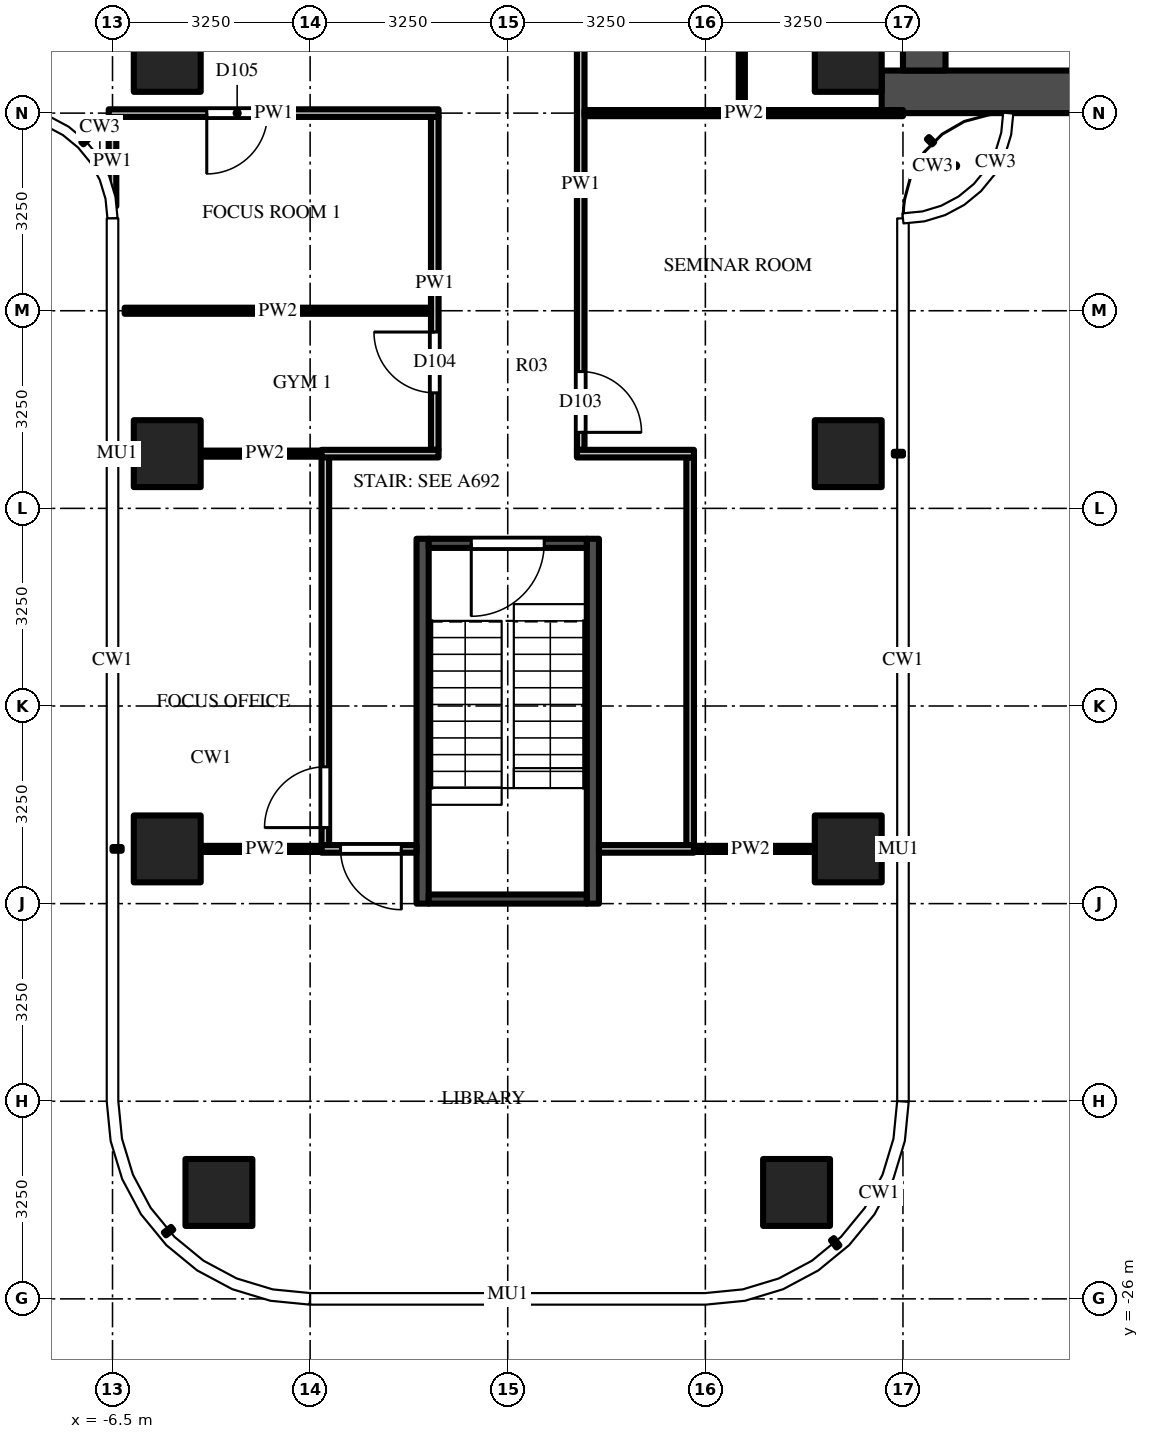
"""IFC4 building model, lengths in metres.
Left out: names, types, materials, properties, quantities, classifications, styles, units other than length and angle.
Written with IfcOpenShell. Run it as: python <this file> out.ifc"""

import sys

from ifc_helpers import new_model, si_unit, direction, frame, frame_2d, origin, origin_2d, place, context, subcontext, project, spatial, rectangle, extrude, source, transform, mapped, element, fill, save


model = new_model("IFC4")
c1 = context("Model", 3, precision=1e-05, world=origin(), true_north=direction((0.0, 1.0)))
c2 = subcontext(c1, "Body", "Model", "MODEL_VIEW")
j1 = project(units=[si_unit("LENGTHUNIT", "METRE"), si_unit("PLANEANGLEUNIT", "RADIAN")], contexts=[c1])
p1 = place(None, origin())
s1 = spatial("IfcSite", under=j1, at=p1, CompositionType="ELEMENT")
p2 = place(p1, origin())
s2 = spatial("IfcBuilding", under=s1, at=p2, CompositionType="ELEMENT")
p3 = place(p2, frame((0.0, 0.0, 220.7)))
s3 = spatial("IfcBuildingStorey", under=s2, at=p3, CompositionType="ELEMENT", Elevation=220.7)
m1 = source(origin(), c2, "Body", "SweptSolid", [
    extrude(rectangle(XDim=1.1, YDim=1.1, at=origin_2d()), origin(), (0.0, 0.0, 1.0), 3.9),
])
for number, where, z_axis, x_axis in (
    (1, (5.6, -5.6, 0.0), (0.0, 0.0, 1.0), (1.0, 0.0, 0.0)),
    (2, (-5.6, -5.6, 0.0), (0.0, 0.0, 1.0), (1.0, 0.0, 0.0)),
    (3, (5.6, -12.1, 0.0), (0.0, 0.0, 1.0), (1.0, 0.0, 0.0)),
    (4, (5.6, -18.6, 0.0), (0.0, 0.0, 1.0), (1.0, 0.0, 0.0)),
    (5, (4.75, -24.25, 0.0), (0.0, 0.0, 1.0), (1.0, 0.0, 0.0)),
    (6, (-5.6, -12.1, 0.0), (0.0, 0.0, 1.0), (1.0, 0.0, 0.0)),
    (7, (-5.6, -18.6, 0.0), (0.0, 0.0, 1.0), (1.0, 0.0, 0.0)),
    (8, (-4.75, -24.25, 0.0), (0.0, 0.0, 1.0), (1.0, 0.0, 0.0)),
):
    element("IfcColumn", number, at=place(p3, frame(where, z_axis=z_axis, x_axis=x_axis)), inside=s3, PredefinedType="COLUMN", context=c2, shape_type="MappedRepresentation", body=[
        mapped(m1, transform((0.0, 0.0, 0.0))),
    ])
m2 = source(origin(), c2, "Body", "SweptSolid", [
    extrude(rectangle(XDim=16.6, YDim=0.7, at=frame_2d((8.3, 0.0))), origin(), (0.0, 0.0, 1.0), 3.7),
])
p4 = place(p3, frame((6.15, -6.15, 0.0), z_axis=(0.0, 0.0, 1.0), x_axis=(1.0, 0.0, 0.0)))
e9 = element("IfcWall", 9, at=p4, inside=s3, PredefinedType="SHEAR", context=c2, shape_type="MappedRepresentation", body=[
    mapped(m2, transform((0.0, 0.0, 0.0))),
])
m3 = source(origin(), c2, "Body", "SweptSolid", [
    extrude(rectangle(XDim=9.05, YDim=0.7, at=frame_2d((4.525, 0.0))), origin(), (0.0, 0.0, 1.0), 3.7),
])
p5 = place(p3, frame((6.85, -5.8, 0.0), z_axis=(0.0, 0.0, 1.0), x_axis=(0.0, 1.0, 0.0)))
e10 = element("IfcWall", 10, at=p5, inside=s3, PredefinedType="SHEAR", context=c2, shape_type="MappedRepresentation", body=[
    mapped(m3, transform((0.0, 0.0, 0.0))),
])
m4 = source(origin(), c2, "Body", "SweptSolid", [
    extrude(rectangle(XDim=1.8, YDim=2.1, at=frame_2d((0.9, 1.05))), frame((0.0, 0.36, 0.0), z_axis=(0.0, -1.0, 0.0), x_axis=(1.0, 0.0, 0.0)), (0.0, 0.0, 1.0), 0.72),
])
p6 = place(p5, frame((3.15, 0.0, 0.0)))
e11 = element("IfcOpeningElement", 11, at=p6, cuts=e10, PredefinedType="OPENING", context=c2, shape_type="MappedRepresentation", body=[
    mapped(m4, transform((0.0, 0.0, 0.0))),
])
m5 = source(origin(), c2, "Body", "SweptSolid", [
    extrude(rectangle(XDim=6.0, YDim=0.2, at=frame_2d((3.0, 0.0))), origin(), (0.0, 0.0, 1.0), 3.7),
])
for number, where, z_axis, x_axis in (
    (12, (1.4, -13.5, 0.0), (0.0, 0.0, 1.0), (0.0, -1.0, 0.0)),
    (13, (-1.4, -13.5, 0.0), (0.0, 0.0, 1.0), (0.0, -1.0, 0.0)),
):
    element("IfcWall", number, at=place(p3, frame(where, z_axis=z_axis, x_axis=x_axis)), inside=s3, PredefinedType="SHEAR", context=c2, shape_type="MappedRepresentation", body=[
        mapped(m5, transform((0.0, 0.0, 0.0))),
    ])
m6 = source(origin(), c2, "Body", "SweptSolid", [
    extrude(rectangle(XDim=2.6, YDim=0.15, at=frame_2d((1.3, 0.0))), origin(), (0.0, 0.0, 1.0), 3.7),
])
p7 = place(p3, frame((1.3, -13.575, 0.0), z_axis=(0.0, 0.0, 1.0), x_axis=(-1.0, 0.0, 0.0)))
e14 = element("IfcWall", 14, at=p7, inside=s3, PredefinedType="SHEAR", context=c2, shape_type="MappedRepresentation", body=[
    mapped(m6, transform((0.0, 0.0, 0.0))),
])
m7 = source(origin(), c2, "Body", "SweptSolid", [
    extrude(rectangle(XDim=1.2, YDim=2.1, at=frame_2d((0.6, 1.05))), frame((0.0, 0.085, 0.0), z_axis=(0.0, -1.0, 0.0), x_axis=(1.0, 0.0, 0.0)), (0.0, 0.0, 1.0), 0.17),
])
p8 = place(p7, frame((0.7, 0.0, 0.0)))
e15 = element("IfcOpeningElement", 15, at=p8, cuts=e14, PredefinedType="OPENING", context=c2, shape_type="MappedRepresentation", body=[
    mapped(m7, transform((0.0, 0.0, 0.0))),
])
p9 = place(p3, frame((1.3, -19.425, 0.0), z_axis=(0.0, 0.0, 1.0), x_axis=(-1.0, 0.0, 0.0)))
e16 = element("IfcWall", 16, at=p9, inside=s3, PredefinedType="SHEAR", context=c2, shape_type="MappedRepresentation", body=[
    mapped(m6, transform((0.0, 0.0, 0.0))),
])
m8 = source(origin(), c2, "Body", "SweptSolid", [
    extrude(rectangle(XDim=1.469, YDim=0.125, at=frame_2d((0.734, 0.0))), origin(), (0.0, 0.0, 1.0), 3.7),
])
p10 = place(p3, frame((-6.5, -6.562, 0.0), z_axis=(0.0, 0.0, 1.0), x_axis=(0.0, -1.0, 0.0)))
e17 = element("IfcWall", 17, at=p10, inside=s3, PredefinedType="PARTITIONING", context=c2, shape_type="MappedRepresentation", body=[
    mapped(m8, transform((0.0, 0.0, 0.0))),
])
m9 = source(origin(), c2, "Body", "SweptSolid", [
    extrude(rectangle(XDim=6.4, YDim=0.125, at=frame_2d((3.2, 0.0))), origin(), (0.0, 0.0, 1.0), 2.997),
])
p11 = place(p3, frame((-3.0, -18.55, 0.0), z_axis=(0.0, 0.0, 1.0), x_axis=(0.0, 1.0, 0.0)))
e18 = element("IfcWall", 18, at=p11, inside=s3, PredefinedType="PARTITIONING", context=c2, shape_type="MappedRepresentation", body=[
    mapped(m9, transform((0.0, 0.0, 0.0))),
])
m10 = source(origin(), c2, "Body", "SweptSolid", [
    extrude(rectangle(XDim=1.0, YDim=2.1, at=frame_2d((0.5, 1.05))), frame((0.0, 0.073, 0.0), z_axis=(0.0, -1.0, 0.0), x_axis=(1.0, 0.0, 0.0)), (0.0, 0.0, 1.0), 0.145),
])
p12 = place(p11, frame((0.3, 0.0, 0.0)))
e19 = element("IfcOpeningElement", 19, at=p12, cuts=e18, PredefinedType="OPENING", context=c2, shape_type="MappedRepresentation", body=[
    mapped(m10, transform((0.0, 0.0, 0.0))),
])
m11 = source(origin(), c2, "Body", "SweptSolid", [
    extrude(rectangle(XDim=5.475, YDim=0.125, at=frame_2d((2.738, 0.0))), origin(), (0.0, 0.0, 1.0), 2.997),
])
p13 = place(p3, frame((-1.2, -12.038, 0.0), z_axis=(0.0, 0.0, 1.0), x_axis=(0.0, 1.0, 0.0)))
e20 = element("IfcWall", 20, at=p13, inside=s3, PredefinedType="PARTITIONING", context=c2, shape_type="MappedRepresentation", body=[
    mapped(m11, transform((0.0, 0.0, 0.0))),
])
p14 = place(p13, frame((0.938, 0.0, 0.0)))
e21 = element("IfcOpeningElement", 21, at=p14, cuts=e20, PredefinedType="OPENING", context=c2, shape_type="MappedRepresentation", body=[
    mapped(m10, transform((0.0, 0.0, 0.0))),
])
m12 = source(origin(), c2, "Body", "SweptSolid", [
    extrude(rectangle(XDim=8.725, YDim=0.125, at=frame_2d((4.363, 0.0))), origin(), (0.0, 0.0, 1.0), 2.997),
])
p15 = place(p3, frame((1.2, -3.312, 0.0), z_axis=(0.0, 0.0, 1.0), x_axis=(0.0, -1.0, 0.0)))
e22 = element("IfcWall", 22, at=p15, inside=s3, PredefinedType="PARTITIONING", context=c2, shape_type="MappedRepresentation", body=[
    mapped(m12, transform((0.0, 0.0, 0.0))),
])
p16 = place(p15, frame((7.438, 0.0, 0.0)))
e23 = element("IfcOpeningElement", 23, at=p16, cuts=e22, PredefinedType="OPENING", context=c2, shape_type="MappedRepresentation", body=[
    mapped(m10, transform((0.0, 0.0, 0.0))),
])
m13 = source(origin(), c2, "Body", "SweptSolid", [
    extrude(rectangle(XDim=1.1, YDim=2.1, at=frame_2d((0.55, 1.05))), frame((0.0, 0.073, 0.0), z_axis=(0.0, -1.0, 0.0), x_axis=(1.0, 0.0, 0.0)), (0.0, 0.0, 1.0), 0.145),
])
p17 = place(p15, frame((0.288, 0.0, 0.0)))
e24 = element("IfcOpeningElement", 24, at=p17, cuts=e22, PredefinedType="OPENING", context=c2, shape_type="MappedRepresentation", body=[
    mapped(m13, transform((0.0, 0.0, 0.0))),
])
m14 = source(origin(), c2, "Body", "SweptSolid", [
    extrude(rectangle(XDim=6.387, YDim=0.125, at=frame_2d((3.194, 0.0))), origin(), (0.0, 0.0, 1.0), 2.997),
])
p18 = place(p3, frame((3.0, -12.163, 0.0), z_axis=(0.0, 0.0, 1.0), x_axis=(0.0, -1.0, 0.0)))
e25 = element("IfcWall", 25, at=p18, inside=s3, PredefinedType="PARTITIONING", context=c2, shape_type="MappedRepresentation", body=[
    mapped(m14, transform((0.0, 0.0, 0.0))),
])
m15 = source(origin(), c2, "Body", "SweptSolid", [
    extrude(rectangle(XDim=3.137, YDim=0.1, at=frame_2d((1.569, 0.0))), origin(), (0.0, 0.0, 1.0), 2.997),
])
p19 = place(p3, frame((3.85, -6.45, 0.0), z_axis=(0.0, 0.0, 1.0), x_axis=(0.0, 1.0, 0.0)))
e26 = element("IfcWall", 26, at=p19, inside=s3, PredefinedType="PARTITIONING", context=c2, shape_type="MappedRepresentation", body=[
    mapped(m15, transform((0.0, 0.0, 0.0))),
])
m16 = source(origin(), c2, "Body", "SweptSolid", [
    extrude(rectangle(XDim=2.113, YDim=0.1, at=frame_2d((1.056, 0.0))), origin(), (0.0, 0.0, 1.0), 3.223),
])
for number, where, z_axis, x_axis in (
    (27, (-5.05, -18.6, 0.0), (0.0, 0.0, 1.0), (1.0, 0.0, 0.0)),
    (28, (2.938, -18.6, 0.0), (0.0, 0.0, 1.0), (1.0, 0.0, 0.0)),
):
    element("IfcWall", number, at=place(p3, frame(where, z_axis=z_axis, x_axis=x_axis)), inside=s3, PredefinedType="PARTITIONING", context=c2, shape_type="MappedRepresentation", body=[
        mapped(m16, transform((0.0, 0.0, 0.0))),
    ])
m17 = source(origin(), c2, "Body", "SweptSolid", [
    extrude(rectangle(XDim=1.562, YDim=0.125, at=frame_2d((0.781, 0.0))), origin(), (0.0, 0.0, 1.0), 3.223),
])
p20 = place(p3, frame((-1.5, -18.6, 0.0), z_axis=(0.0, 0.0, 1.0), x_axis=(-1.0, 0.0, 0.0)))
e29 = element("IfcWall", 29, at=p20, inside=s3, PredefinedType="PARTITIONING", context=c2, shape_type="MappedRepresentation", body=[
    mapped(m17, transform((0.0, 0.0, 0.0))),
])
p21 = place(p20, frame((0.25, 0.0, 0.0)))
e30 = element("IfcOpeningElement", 30, at=p21, cuts=e29, PredefinedType="OPENING", context=c2, shape_type="MappedRepresentation", body=[
    mapped(m10, transform((0.0, 0.0, 0.0))),
])
p22 = place(p3, frame((3.062, -18.6, 0.0), z_axis=(0.0, 0.0, 1.0), x_axis=(-1.0, 0.0, 0.0)))
e31 = element("IfcWall", 31, at=p22, inside=s3, PredefinedType="PARTITIONING", context=c2, shape_type="MappedRepresentation", body=[
    mapped(m17, transform((0.0, 0.0, 0.0))),
])
m18 = source(origin(), c2, "Body", "SweptSolid", [
    extrude(rectangle(XDim=2.113, YDim=0.1, at=frame_2d((1.056, 0.0))), origin(), (0.0, 0.0, 1.0), 2.997),
])
p23 = place(p3, frame((-5.05, -12.1, 0.0), z_axis=(0.0, 0.0, 1.0), x_axis=(1.0, 0.0, 0.0)))
e32 = element("IfcWall", 32, at=p23, inside=s3, PredefinedType="PARTITIONING", context=c2, shape_type="MappedRepresentation", body=[
    mapped(m18, transform((0.0, 0.0, 0.0))),
])
m19 = source(origin(), c2, "Body", "SweptSolid", [
    extrude(rectangle(XDim=1.925, YDim=0.125, at=frame_2d((0.962, 0.0))), origin(), (0.0, 0.0, 1.0), 2.997),
])
for number, where, z_axis, x_axis in (
    (33, (-3.062, -12.1, 0.0), (0.0, 0.0, 1.0), (1.0, 0.0, 0.0)),
    (34, (1.137, -12.1, 0.0), (0.0, 0.0, 1.0), (1.0, 0.0, 0.0)),
):
    element("IfcWall", number, at=place(p3, frame(where, z_axis=z_axis, x_axis=x_axis)), inside=s3, PredefinedType="PARTITIONING", context=c2, shape_type="MappedRepresentation", body=[
        mapped(m19, transform((0.0, 0.0, 0.0))),
    ])
m20 = source(origin(), c2, "Body", "SweptSolid", [
    extrude(rectangle(XDim=5.038, YDim=0.1, at=frame_2d((2.519, 0.0))), origin(), (0.0, 0.0, 1.0), 2.78),
])
p24 = place(p3, frame((-6.3, -9.75, 0.0), z_axis=(0.0, 0.0, 1.0), x_axis=(1.0, 0.0, 0.0)))
e35 = element("IfcWall", 35, at=p24, inside=s3, PredefinedType="PARTITIONING", context=c2, shape_type="MappedRepresentation", body=[
    mapped(m20, transform((0.0, 0.0, 0.0))),
])
m21 = source(origin(), c2, "Body", "SweptSolid", [
    extrude(rectangle(XDim=5.238, YDim=0.1, at=frame_2d((2.619, 0.0))), origin(), (0.0, 0.0, 1.0), 2.78),
])
p25 = place(p3, frame((1.262, -6.5, 0.0), z_axis=(0.0, 0.0, 1.0), x_axis=(1.0, 0.0, 0.0)))
e36 = element("IfcWall", 36, at=p25, inside=s3, PredefinedType="PARTITIONING", context=c2, shape_type="MappedRepresentation", body=[
    mapped(m21, transform((0.0, 0.0, 0.0))),
])
m22 = source(origin(), c2, "Body", "SweptSolid", [
    extrude(rectangle(XDim=5.425, YDim=0.125, at=frame_2d((2.712, 0.0))), origin(), (0.0, 0.0, 1.0), 2.78),
])
p26 = place(p3, frame((-1.137, -6.5, 0.0), z_axis=(0.0, 0.0, 1.0), x_axis=(-1.0, 0.0, 0.0)))
e37 = element("IfcWall", 37, at=p26, inside=s3, PredefinedType="PARTITIONING", context=c2, shape_type="MappedRepresentation", body=[
    mapped(m22, transform((0.0, 0.0, 0.0))),
])
p27 = place(p26, frame((2.812, 0.0, 0.0)))
e38 = element("IfcOpeningElement", 38, at=p27, cuts=e37, PredefinedType="OPENING", context=c2, shape_type="MappedRepresentation", body=[
    mapped(m10, transform((0.0, 0.0, 0.0))),
])
m23 = source(origin(), c2, "Body", "SweptSolid", [
    extrude(rectangle(XDim=1.2, YDim=2.1, at=frame_2d((0.6, 1.05))), frame((0.0, 0.025, 0.0), z_axis=(0.0, -1.0, 0.0), x_axis=(1.0, 0.0, 0.0)), (0.0, 0.0, 1.0), 0.05),
])
p28 = place(p8, origin())
e39 = element("IfcDoor", 39, at=p28, inside=s3, OperationType="SINGLE_SWING_RIGHT", PredefinedType="DOOR", context=c2, shape_type="MappedRepresentation", body=[
    mapped(m23, transform((0.0, 0.0, 0.0))),
])
fill(e15, e39)
m24 = source(origin(), c2, "Body", "SweptSolid", [
    extrude(rectangle(XDim=1.0, YDim=2.1, at=frame_2d((0.5, 1.05))), frame((0.0, 0.025, 0.0), z_axis=(0.0, -1.0, 0.0), x_axis=(1.0, 0.0, 0.0)), (0.0, 0.0, 1.0), 0.05),
])
p29 = place(p21, origin())
e40 = element("IfcDoor", 40, at=p29, inside=s3, OperationType="SINGLE_SWING_LEFT", PredefinedType="DOOR", context=c2, shape_type="MappedRepresentation", body=[
    mapped(m24, transform((0.0, 0.0, 0.0))),
])
fill(e30, e40)
p30 = place(p12, origin())
e41 = element("IfcDoor", 41, at=p30, inside=s3, OperationType="SINGLE_SWING_LEFT", PredefinedType="DOOR", context=c2, shape_type="MappedRepresentation", body=[
    mapped(m24, transform((0.0, 0.0, 0.0))),
])
fill(e19, e41)
p31 = place(p16, origin())
e42 = element("IfcDoor", 42, at=p31, inside=s3, OperationType="SINGLE_SWING_RIGHT", PredefinedType="DOOR", context=c2, shape_type="MappedRepresentation", body=[
    mapped(m24, transform((0.0, 0.0, 0.0))),
])
fill(e23, e42)
p32 = place(p14, origin())
e43 = element("IfcDoor", 43, at=p32, inside=s3, OperationType="SINGLE_SWING_RIGHT", PredefinedType="DOOR", context=c2, shape_type="MappedRepresentation", body=[
    mapped(m24, transform((0.0, 0.0, 0.0))),
])
fill(e21, e43)
p33 = place(p27, origin())
e44 = element("IfcDoor", 44, at=p33, inside=s3, OperationType="SINGLE_SWING_RIGHT", PredefinedType="DOOR", context=c2, shape_type="MappedRepresentation", body=[
    mapped(m24, transform((0.0, 0.0, 0.0))),
])
fill(e38, e44)
save(model, sys.argv[1])
